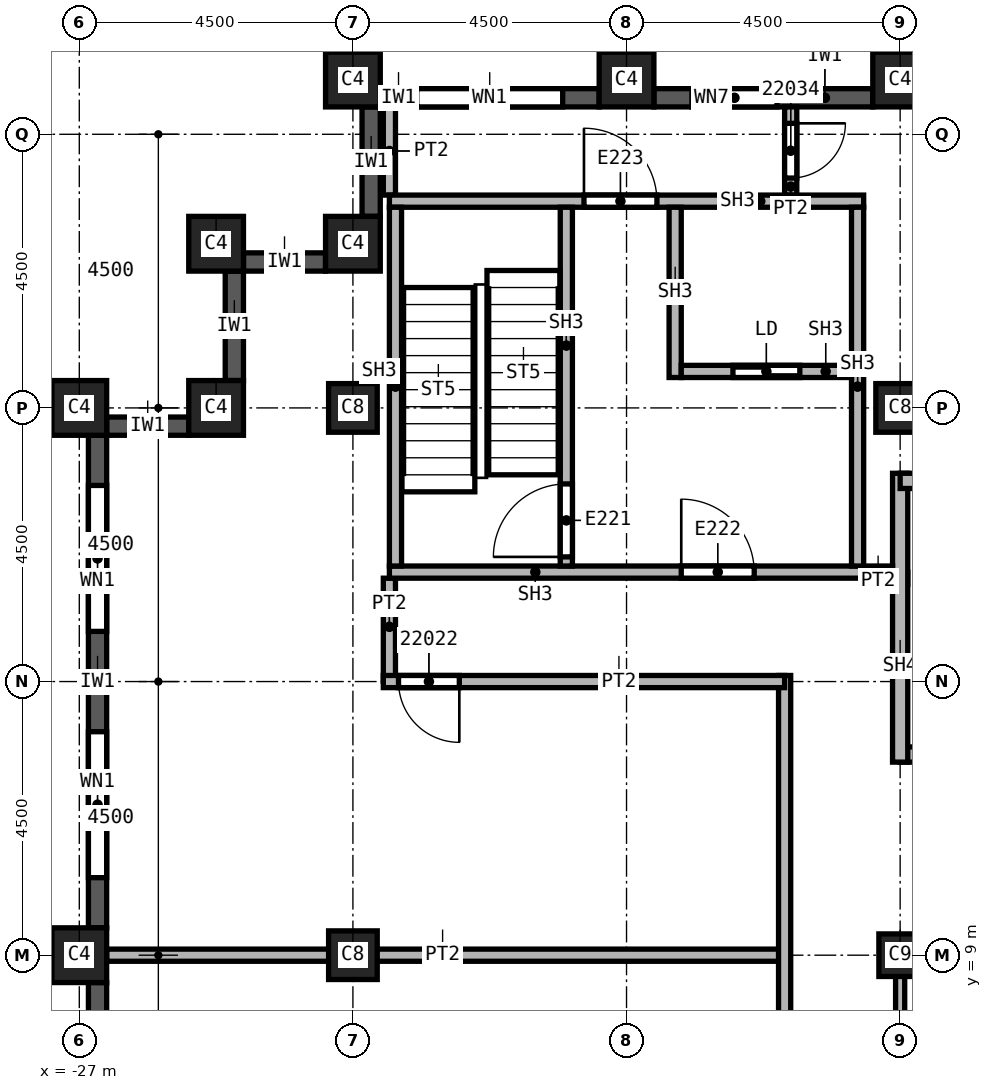
"""IFC4 building model, lengths in metres.
Left out: names, types, materials, properties, quantities, classifications, styles, units other than length and angle.
Written with IfcOpenShell. Run it as: python <this file> out.ifc"""

import sys

from ifc_helpers import new_model, si_unit, direction, frame, frame_2d, origin, origin_2d, place, context, subcontext, project, spatial, rectangle, extrude, element, fill, save


model = new_model("IFC4")
c1 = context("Model", 3, precision=1e-05, world=origin(), true_north=direction((0.0, 1.0)))
c2 = subcontext(c1, "Body", "Model", "MODEL_VIEW")
j1 = project(units=[si_unit("LENGTHUNIT", "METRE"), si_unit("PLANEANGLEUNIT", "RADIAN")], contexts=[c1])
p1 = place(None, origin())
s1 = spatial("IfcSite", under=j1, at=p1, CompositionType="ELEMENT")
p2 = place(p1, origin())
s2 = spatial("IfcBuilding", under=s1, at=p2, CompositionType="ELEMENT")
p3 = place(p2, frame((0.0, 0.0, 316.0)))
s3 = spatial("IfcBuildingStorey", under=s2, at=p3, CompositionType="ELEMENT", Elevation=316.0)
for number, where, z_axis, x_axis in (
    (1, (-13.5, 18.0, 0.0), (0.0, 0.0, 1.0), (1.0, 0.0, 0.0)),
    (2, (-22.5, 9.0, 0.0), (0.0, 0.0, 1.0), (1.0, 0.0, 0.0)),
    (3, (-22.5, 18.0, 0.0), (0.0, 0.0, 1.0), (1.0, 0.0, 0.0)),
):
    element("IfcColumn", number, at=place(p3, frame(where, z_axis=z_axis, x_axis=x_axis)), inside=s3, PredefinedType="COLUMN", context=c2, shape_type="SweptSolid", body=[
        extrude(rectangle(XDim=0.8, YDim=0.8, at=origin_2d()), origin(), (0.0, 0.0, 1.0), 3.59),
    ])
p4 = place(p3, frame((-13.5, 9.0, 0.0), z_axis=(0.0, 0.0, 1.0), x_axis=(1.0, 0.0, 0.0)))
e4 = element("IfcColumn", 4, at=p4, inside=s3, PredefinedType="COLUMN", context=c2, shape_type="SweptSolid", body=[
    extrude(rectangle(XDim=0.7, YDim=0.7, at=origin_2d()), origin(), (0.0, 0.0, 1.0), 3.59),
])
for number, where, z_axis, x_axis in (
    (5, (-13.5, 23.4, 0.0), (0.0, 0.0, 1.0), (1.0, 0.0, 0.0)),
    (6, (-18.0, 23.4, 0.0), (0.0, 0.0, 1.0), (1.0, 0.0, 0.0)),
    (7, (-22.5, 23.4, 0.0), (0.0, 0.0, 1.0), (1.0, 0.0, 0.0)),
    (8, (-27.0, 9.0, 0.0), (0.0, 0.0, 1.0), (0.0, 1.0, 0.0)),
    (9, (-27.0, 18.0, 0.0), (0.0, 0.0, 1.0), (0.0, 1.0, 0.0)),
    (10, (-22.5, 20.7, 0.0), (0.0, 0.0, 1.0), (1.0, 0.0, 0.0)),
    (11, (-24.75, 20.7, 0.0), (0.0, 0.0, 1.0), (1.0, 0.0, 0.0)),
    (12, (-24.75, 18.0, 0.0), (0.0, 0.0, 1.0), (1.0, 0.0, 0.0)),
):
    element("IfcColumn", number, at=place(p3, frame(where, z_axis=z_axis, x_axis=x_axis)), inside=s3, PredefinedType="COLUMN", context=c2, shape_type="SweptSolid", body=[
        extrude(rectangle(XDim=0.9, YDim=0.9, at=origin_2d()), origin(), (0.0, 0.0, 1.0), 3.59),
    ])
p5 = place(p3, frame((-24.45, 20.25, 0.0), z_axis=(0.0, 0.0, 1.0), x_axis=(0.0, -1.0, 0.0)))
e13 = element("IfcWall", 13, at=p5, inside=s3, PredefinedType="SOLIDWALL", context=c2, shape_type="SweptSolid", body=[
    extrude(rectangle(XDim=1.8, YDim=0.3, at=frame_2d((0.9, 0.0))), origin(), (0.0, 0.0, 1.0), 2.99),
])
p6 = place(p3, frame((-25.2, 17.7, 0.0), z_axis=(0.0, 0.0, 1.0), x_axis=(-1.0, 0.0, 0.0)))
e14 = element("IfcWall", 14, at=p6, inside=s3, PredefinedType="SOLIDWALL", context=c2, shape_type="SweptSolid", body=[
    extrude(rectangle(XDim=1.35, YDim=0.3, at=frame_2d((0.675, 0.0))), origin(), (0.0, 0.0, 1.0), 2.99),
])
p7 = place(p3, frame((-26.7, 17.55, 0.0), z_axis=(0.0, 0.0, 1.0), x_axis=(0.0, -1.0, 0.0)))
e15 = element("IfcWall", 15, at=p7, inside=s3, PredefinedType="SOLIDWALL", context=c2, shape_type="SweptSolid", body=[
    extrude(rectangle(XDim=8.1, YDim=0.3, at=frame_2d((4.05, 0.0))), origin(), (0.0, 0.0, 1.0), 2.99),
])
p8 = place(p7, frame((0.825, 0.0, 0.8)))
e16 = element("IfcOpeningElement", 16, at=p8, cuts=e15, PredefinedType="OPENING", context=c2, shape_type="SweptSolid", body=[
    extrude(rectangle(XDim=2.4, YDim=1.95, at=frame_2d((1.2, 0.975))), frame((0.0, 0.15, 0.0), z_axis=(0.0, -1.0, 0.0), x_axis=(1.0, 0.0, 0.0)), (0.0, 0.0, 1.0), 0.3),
])
p9 = place(p7, frame((4.875, 0.0, 0.8)))
e17 = element("IfcOpeningElement", 17, at=p9, cuts=e15, PredefinedType="OPENING", context=c2, shape_type="SweptSolid", body=[
    extrude(rectangle(XDim=2.4, YDim=1.95, at=frame_2d((1.2, 0.975))), frame((0.0, 0.15, 0.0), z_axis=(0.0, -1.0, 0.0), x_axis=(1.0, 0.0, 0.0)), (0.0, 0.0, 1.0), 0.3),
])
p10 = place(p3, frame((-26.7, 8.55, 0.0), z_axis=(0.0, 0.0, 1.0), x_axis=(0.0, -1.0, 0.0)))
e18 = element("IfcWall", 18, at=p10, inside=s3, PredefinedType="SOLIDWALL", context=c2, shape_type="SweptSolid", body=[
    extrude(rectangle(XDim=8.1, YDim=0.3, at=frame_2d((4.05, 0.0))), origin(), (0.0, 0.0, 1.0), 2.99),
])
p11 = place(p10, frame((0.825, 0.0, 0.8)))
e19 = element("IfcOpeningElement", 19, at=p11, cuts=e18, PredefinedType="OPENING", context=c2, shape_type="SweptSolid", body=[
    extrude(rectangle(XDim=2.4, YDim=1.95, at=frame_2d((1.2, 0.975))), frame((0.0, 0.15, 0.0), z_axis=(0.0, -1.0, 0.0), x_axis=(1.0, 0.0, 0.0)), (0.0, 0.0, 1.0), 0.3),
])
p12 = place(p10, frame((4.875, 0.0, 0.8)))
e20 = element("IfcOpeningElement", 20, at=p12, cuts=e18, PredefinedType="OPENING", context=c2, shape_type="SweptSolid", body=[
    extrude(rectangle(XDim=2.4, YDim=1.95, at=frame_2d((1.2, 0.975))), frame((0.0, 0.15, 0.0), z_axis=(0.0, -1.0, 0.0), x_axis=(1.0, 0.0, 0.0)), (0.0, 0.0, 1.0), 0.3),
])
p13 = place(p3, frame((-13.95, 23.1, 0.0), z_axis=(0.0, 0.0, 1.0), x_axis=(-1.0, 0.0, 0.0)))
e21 = element("IfcWall", 21, at=p13, inside=s3, PredefinedType="SOLIDWALL", context=c2, shape_type="SweptSolid", body=[
    extrude(rectangle(XDim=3.6, YDim=0.3, at=frame_2d((1.8, 0.0))), origin(), (0.0, 0.0, 1.0), 2.99),
])
p14 = place(p13, frame((1.575, 0.0, 0.8)))
e22 = element("IfcOpeningElement", 22, at=p14, cuts=e21, PredefinedType="OPENING", context=c2, shape_type="SweptSolid", body=[
    extrude(rectangle(XDim=1.4, YDim=1.95, at=frame_2d((0.7, 0.975))), frame((0.0, 0.15, 0.0), z_axis=(0.0, -1.0, 0.0), x_axis=(1.0, 0.0, 0.0)), (0.0, 0.0, 1.0), 0.3),
])
p15 = place(p3, frame((-18.45, 23.1, 0.0), z_axis=(0.0, 0.0, 1.0), x_axis=(-1.0, 0.0, 0.0)))
e23 = element("IfcWall", 23, at=p15, inside=s3, PredefinedType="SOLIDWALL", context=c2, shape_type="SweptSolid", body=[
    extrude(rectangle(XDim=3.6, YDim=0.3, at=frame_2d((1.8, 0.0))), origin(), (0.0, 0.0, 1.0), 2.99),
])
p16 = place(p15, frame((0.6, 0.0, 0.8)))
e24 = element("IfcOpeningElement", 24, at=p16, cuts=e23, PredefinedType="OPENING", context=c2, shape_type="SweptSolid", body=[
    extrude(rectangle(XDim=2.4, YDim=1.95, at=frame_2d((1.2, 0.975))), frame((0.0, 0.15, 0.0), z_axis=(0.0, -1.0, 0.0), x_axis=(1.0, 0.0, 0.0)), (0.0, 0.0, 1.0), 0.3),
])
p17 = place(p3, frame((-22.2, 22.95, 0.0), z_axis=(0.0, 0.0, 1.0), x_axis=(0.0, -1.0, 0.0)))
e25 = element("IfcWall", 25, at=p17, inside=s3, PredefinedType="SOLIDWALL", context=c2, shape_type="SweptSolid", body=[
    extrude(rectangle(XDim=1.8, YDim=0.3, at=frame_2d((0.9, 0.0))), origin(), (0.0, 0.0, 1.0), 2.99),
])
p18 = place(p3, frame((-22.95, 20.4, 0.0), z_axis=(0.0, 0.0, 1.0), x_axis=(-1.0, 0.0, 0.0)))
e26 = element("IfcWall", 26, at=p18, inside=s3, PredefinedType="SOLIDWALL", context=c2, shape_type="SweptSolid", body=[
    extrude(rectangle(XDim=1.35, YDim=0.3, at=frame_2d((0.675, 0.0))), origin(), (0.0, 0.0, 1.0), 2.99),
])
p19 = place(p3, frame((-26.55, 9.0, 0.0), z_axis=(0.0, 0.0, 1.0), x_axis=(1.0, 0.0, 0.0)))
e27 = element("IfcWall", 27, at=p19, inside=s3, PredefinedType="PARTITIONING", context=c2, shape_type="SweptSolid", body=[
    extrude(rectangle(XDim=11.15, YDim=0.2, at=frame_2d((5.575, 0.0))), origin(), (0.0, 0.0, 1.0), 3.59),
])
p20 = place(p3, frame((-21.9, 13.5, 0.0), z_axis=(0.0, 0.0, 1.0), x_axis=(0.0, 1.0, 0.0)))
e28 = element("IfcWall", 28, at=p20, inside=s3, PredefinedType="PARTITIONING", context=c2, shape_type="SweptSolid", body=[
    extrude(rectangle(XDim=1.7, YDim=0.2, at=frame_2d((0.85, 0.0))), origin(), (0.0, 0.0, 1.0), 3.59),
])
p21 = place(p3, frame((-21.9, 21.5, 0.0), z_axis=(0.0, 0.0, 1.0), x_axis=(0.0, 1.0, 0.0)))
e29 = element("IfcWall", 29, at=p21, inside=s3, PredefinedType="PARTITIONING", context=c2, shape_type="SweptSolid", body=[
    extrude(rectangle(XDim=1.45, YDim=0.2, at=frame_2d((0.725, 0.0))), origin(), (0.0, 0.0, 1.0), 3.59),
])
p22 = place(p3, frame((-15.4, -22.95, 0.0), z_axis=(0.0, 0.0, 1.0), x_axis=(0.0, 1.0, 0.0)))
e30 = element("IfcWall", 30, at=p22, inside=s3, PredefinedType="PARTITIONING", context=c2, shape_type="SweptSolid", body=[
    extrude(rectangle(XDim=36.55, YDim=0.2, at=frame_2d((18.275, 0.0))), origin(), (0.0, 0.0, 1.0), 3.59),
])
p23 = place(p22, frame((24.3, 0.0, 0.0)))
e31 = element("IfcOpeningElement", 31, at=p23, cuts=e30, PredefinedType="OPENING", context=c2, shape_type="SweptSolid", body=[
    extrude(rectangle(XDim=1.0, YDim=2.1, at=frame_2d((0.5, 1.05))), frame((0.0, 0.1, 0.0), z_axis=(0.0, -1.0, 0.0), x_axis=(1.0, 0.0, 0.0)), (0.0, 0.0, 1.0), 0.2),
])
p24 = place(p22, frame((9.4, 0.0, 0.0)))
e32 = element("IfcOpeningElement", 32, at=p24, cuts=e30, PredefinedType="OPENING", context=c2, shape_type="SweptSolid", body=[
    extrude(rectangle(XDim=1.0, YDim=2.1, at=frame_2d((0.5, 1.05))), frame((0.0, 0.1, 0.0), z_axis=(0.0, -1.0, 0.0), x_axis=(1.0, 0.0, 0.0)), (0.0, 0.0, 1.0), 0.2),
])
p25 = place(p22, frame((19.05, 0.0, 0.0)))
e33 = element("IfcOpeningElement", 33, at=p25, cuts=e30, PredefinedType="OPENING", context=c2, shape_type="SweptSolid", body=[
    extrude(rectangle(XDim=1.0, YDim=2.1, at=frame_2d((0.5, 1.05))), frame((0.0, 0.1, 0.0), z_axis=(0.0, -1.0, 0.0), x_axis=(1.0, 0.0, 0.0)), (0.0, 0.0, 1.0), 0.2),
])
p26 = place(p3, frame((-15.4, 13.5, 0.0), z_axis=(0.0, 0.0, 1.0), x_axis=(-1.0, 0.0, 0.0)))
e34 = element("IfcWall", 34, at=p26, inside=s3, PredefinedType="PARTITIONING", context=c2, shape_type="SweptSolid", body=[
    extrude(rectangle(XDim=6.6, YDim=0.2, at=frame_2d((3.3, 0.0))), origin(), (0.0, 0.0, 1.0), 3.59),
])
p27 = place(p26, frame((5.35, 0.0, 0.0)))
e35 = element("IfcOpeningElement", 35, at=p27, cuts=e34, PredefinedType="OPENING", context=c2, shape_type="SweptSolid", body=[
    extrude(rectangle(XDim=1.0, YDim=2.1, at=frame_2d((0.5, 1.05))), frame((0.0, 0.1, 0.0), z_axis=(0.0, -1.0, 0.0), x_axis=(1.0, 0.0, 0.0)), (0.0, 0.0, 1.0), 0.2),
])
p28 = place(p3, frame((-15.3, 22.95, 0.0), z_axis=(0.0, 0.0, 1.0), x_axis=(0.0, -1.0, 0.0)))
e36 = element("IfcWall", 36, at=p28, inside=s3, PredefinedType="PARTITIONING", context=c2, shape_type="SweptSolid", body=[
    extrude(rectangle(XDim=1.45, YDim=0.2, at=frame_2d((0.725, 0.0))), origin(), (0.0, 0.0, 1.0), 3.59),
])
p29 = place(p28, frame((0.27, 0.0, 0.0)))
e37 = element("IfcOpeningElement", 37, at=p29, cuts=e36, PredefinedType="OPENING", context=c2, shape_type="SweptSolid", body=[
    extrude(rectangle(XDim=0.9, YDim=2.1, at=frame_2d((0.45, 1.05))), frame((0.0, 0.1, 0.0), z_axis=(0.0, -1.0, 0.0), x_axis=(1.0, 0.0, 0.0)), (0.0, 0.0, 1.0), 0.2),
])
p30 = place(p3, frame((-14.1, 15.2, 0.0), z_axis=(0.0, 0.0, 1.0), x_axis=(1.0, 0.0, 0.0)))
e38 = element("IfcWall", 38, at=p30, inside=s3, PredefinedType="PARTITIONING", context=c2, shape_type="SweptSolid", body=[
    extrude(rectangle(XDim=0.725, YDim=0.2, at=frame_2d((0.363, 0.0))), origin(), (0.0, 0.0, 1.0), 3.59),
])
p31 = place(p3, frame((-13.5, 12.3, 0.0), z_axis=(0.0, 0.0, 1.0), x_axis=(1.0, 0.0, 0.0)))
e39 = element("IfcWall", 39, at=p31, inside=s3, PredefinedType="SOLIDWALL", context=c2, shape_type="SweptSolid", body=[
    extrude(rectangle(XDim=9.125, YDim=0.25, at=frame_2d((4.562, 0.0))), origin(), (0.0, 0.0, 1.0), 3.59),
])
p32 = place(p31, frame((0.6, 0.0, 0.0)))
e40 = element("IfcOpeningElement", 40, at=p32, cuts=e39, PredefinedType="OPENING", context=c2, shape_type="SweptSolid", body=[
    extrude(rectangle(XDim=1.2, YDim=2.1, at=frame_2d((0.6, 1.05))), frame((0.0, 0.125, 0.0), z_axis=(0.0, -1.0, 0.0), x_axis=(1.0, 0.0, 0.0)), (0.0, 0.0, 1.0), 0.25),
])
p33 = place(p3, frame((-13.5, 12.175, 0.0), z_axis=(0.0, 0.0, 1.0), x_axis=(0.0, 1.0, 0.0)))
e41 = element("IfcWall", 41, at=p33, inside=s3, PredefinedType="SOLIDWALL", context=c2, shape_type="SweptSolid", body=[
    extrude(rectangle(XDim=4.75, YDim=0.25, at=frame_2d((2.375, 0.0))), origin(), (0.0, 0.0, 1.0), 3.59),
])
p34 = place(p3, frame((-13.5, 16.8, 0.0), z_axis=(0.0, 0.0, 1.0), x_axis=(1.0, 0.0, 0.0)))
e42 = element("IfcWall", 42, at=p34, inside=s3, PredefinedType="SOLIDWALL", context=c2, shape_type="SweptSolid", body=[
    extrude(rectangle(XDim=9.125, YDim=0.25, at=frame_2d((4.562, 0.0))), origin(), (0.0, 0.0, 1.0), 3.59),
])
p35 = place(p3, frame((-13.5, 3.0, 0.0), z_axis=(0.0, 0.0, 1.0), x_axis=(0.0, 1.0, 0.0)))
e43 = element("IfcWall", 43, at=p35, inside=s3, PredefinedType="PARTITIONING", context=c2, shape_type="SweptSolid", body=[
    extrude(rectangle(XDim=6.075, YDim=0.15, at=frame_2d((3.038, 0.0))), origin(), (0.0, 0.0, 1.0), 2.828),
])
p36 = place(p3, frame((-13.5, 9.0, 0.0), z_axis=(0.0, 0.0, 1.0), x_axis=(1.0, 0.0, 0.0)))
e44 = element("IfcWall", 44, at=p36, inside=s3, PredefinedType="PARTITIONING", context=c2, shape_type="SweptSolid", body=[
    extrude(rectangle(XDim=3.0, YDim=0.15, at=frame_2d((1.5, 0.0))), origin(), (0.0, 0.0, 1.0), 2.828),
])
p37 = place(p3, frame((-21.9, 15.3, 0.0), z_axis=(0.0, 0.0, 1.0), x_axis=(1.0, 0.0, 0.0)))
e45 = element("IfcWall", 45, at=p37, inside=s3, PredefinedType="SOLIDWALL", context=c2, shape_type="SweptSolid", body=[
    extrude(rectangle(XDim=8.275, YDim=0.2, at=frame_2d((4.137, 0.0))), origin(), (0.0, 0.0, 1.0), 3.59),
])
p38 = place(p37, frame((4.8, 0.0, 0.0)))
e46 = element("IfcOpeningElement", 46, at=p38, cuts=e45, PredefinedType="OPENING", context=c2, shape_type="SweptSolid", body=[
    extrude(rectangle(XDim=1.2, YDim=2.1, at=frame_2d((0.6, 1.05))), frame((0.0, 0.1, 0.0), z_axis=(0.0, -1.0, 0.0), x_axis=(1.0, 0.0, 0.0)), (0.0, 0.0, 1.0), 0.2),
])
p39 = place(p3, frame((-21.9, 21.4, 0.0), z_axis=(0.0, 0.0, 1.0), x_axis=(1.0, 0.0, 0.0)))
e47 = element("IfcWall", 47, at=p39, inside=s3, PredefinedType="SOLIDWALL", context=c2, shape_type="SweptSolid", body=[
    extrude(rectangle(XDim=7.8, YDim=0.2, at=frame_2d((3.9, 0.0))), origin(), (0.0, 0.0, 1.0), 3.59),
])
p40 = place(p39, frame((3.2, 0.0, 0.0)))
e48 = element("IfcOpeningElement", 48, at=p40, cuts=e47, PredefinedType="OPENING", context=c2, shape_type="SweptSolid", body=[
    extrude(rectangle(XDim=1.2, YDim=2.1, at=frame_2d((0.6, 1.05))), frame((0.0, 0.1, 0.0), z_axis=(0.0, -1.0, 0.0), x_axis=(1.0, 0.0, 0.0)), (0.0, 0.0, 1.0), 0.2),
])
for number, where, z_axis, x_axis in (
    (49, (-21.8, 15.4, 0.0), (0.0, 0.0, 1.0), (0.0, 1.0, 0.0)),
    (50, (-14.2, 15.4, 0.0), (0.0, 0.0, 1.0), (0.0, 1.0, 0.0)),
):
    element("IfcWall", number, at=place(p3, frame(where, z_axis=z_axis, x_axis=x_axis)), inside=s3, PredefinedType="SOLIDWALL", context=c2, shape_type="SweptSolid", body=[
        extrude(rectangle(XDim=5.9, YDim=0.2, at=frame_2d((2.95, 0.0))), origin(), (0.0, 0.0, 1.0), 3.59),
    ])
p41 = place(p3, frame((-18.99, 15.4, 0.0), z_axis=(0.0, 0.0, 1.0), x_axis=(0.0, 1.0, 0.0)))
e51 = element("IfcWall", 51, at=p41, inside=s3, PredefinedType="SOLIDWALL", context=c2, shape_type="SweptSolid", body=[
    extrude(rectangle(XDim=5.9, YDim=0.2, at=frame_2d((2.95, 0.0))), origin(), (0.0, 0.0, 1.0), 3.59),
])
p42 = place(p41, frame((0.15, 0.0, 0.0)))
e52 = element("IfcOpeningElement", 52, at=p42, cuts=e51, PredefinedType="OPENING", context=c2, shape_type="SweptSolid", body=[
    extrude(rectangle(XDim=1.2, YDim=2.1, at=frame_2d((0.6, 1.05))), frame((0.0, 0.1, 0.0), z_axis=(0.0, -1.0, 0.0), x_axis=(1.0, 0.0, 0.0)), (0.0, 0.0, 1.0), 0.2),
])
p43 = place(p3, frame((-17.2, 18.5, 0.0), z_axis=(0.0, 0.0, 1.0), x_axis=(0.0, 1.0, 0.0)))
e53 = element("IfcWall", 53, at=p43, inside=s3, PredefinedType="SOLIDWALL", context=c2, shape_type="SweptSolid", body=[
    extrude(rectangle(XDim=2.8, YDim=0.2, at=frame_2d((1.4, 0.0))), origin(), (0.0, 0.0, 1.0), 3.59),
])
p44 = place(p3, frame((-17.1, 18.6, 0.0), z_axis=(0.0, 0.0, 1.0), x_axis=(1.0, 0.0, 0.0)))
e54 = element("IfcWall", 54, at=p44, inside=s3, PredefinedType="SOLIDWALL", context=c2, shape_type="SweptSolid", body=[
    extrude(rectangle(XDim=2.8, YDim=0.2, at=frame_2d((1.4, 0.0))), origin(), (0.0, 0.0, 1.0), 3.59),
])
p45 = place(p44, frame((0.85, 0.0, 0.0)))
e55 = element("IfcOpeningElement", 55, at=p45, cuts=e54, PredefinedType="OPENING", context=c2, shape_type="SweptSolid", body=[
    extrude(rectangle(XDim=1.1, YDim=2.1, at=frame_2d((0.55, 1.05))), frame((0.0, 0.1, 0.0), z_axis=(0.0, -1.0, 0.0), x_axis=(1.0, 0.0, 0.0)), (0.0, 0.0, 1.0), 0.2),
])
p46 = place(p8, origin())
e56 = element("IfcWindow", 56, at=p46, inside=s3, PartitioningType="SINGLE_PANEL", PredefinedType="WINDOW", context=c2, shape_type="SweptSolid", body=[
    extrude(rectangle(XDim=2.4, YDim=1.95, at=frame_2d((1.2, 0.975))), frame((0.0, 0.03, 0.0), z_axis=(0.0, -1.0, 0.0), x_axis=(1.0, 0.0, 0.0)), (0.0, 0.0, 1.0), 0.06),
])
fill(e16, e56)
p47 = place(p9, origin())
e57 = element("IfcWindow", 57, at=p47, inside=s3, PartitioningType="SINGLE_PANEL", PredefinedType="WINDOW", context=c2, shape_type="SweptSolid", body=[
    extrude(rectangle(XDim=2.4, YDim=1.95, at=frame_2d((1.2, 0.975))), frame((0.0, 0.03, 0.0), z_axis=(0.0, -1.0, 0.0), x_axis=(1.0, 0.0, 0.0)), (0.0, 0.0, 1.0), 0.06),
])
fill(e17, e57)
p48 = place(p16, origin())
e58 = element("IfcWindow", 58, at=p48, inside=s3, PartitioningType="SINGLE_PANEL", PredefinedType="WINDOW", context=c2, shape_type="SweptSolid", body=[
    extrude(rectangle(XDim=2.4, YDim=1.95, at=frame_2d((1.2, 0.975))), frame((0.0, 0.03, 0.0), z_axis=(0.0, -1.0, 0.0), x_axis=(1.0, 0.0, 0.0)), (0.0, 0.0, 1.0), 0.06),
])
fill(e24, e58)
p49 = place(p27, origin())
e59 = element("IfcDoor", 59, at=p49, inside=s3, OperationType="SINGLE_SWING_LEFT", PredefinedType="DOOR", context=c2, shape_type="SweptSolid", body=[
    extrude(rectangle(XDim=1.0, YDim=2.1, at=frame_2d((0.5, 1.05))), frame((0.0, 0.025, 0.0), z_axis=(0.0, -1.0, 0.0), x_axis=(1.0, 0.0, 0.0)), (0.0, 0.0, 1.0), 0.05),
])
fill(e35, e59)
p50 = place(p29, origin())
e60 = element("IfcDoor", 60, at=p50, inside=s3, OperationType="SINGLE_SWING_LEFT", PredefinedType="DOOR", context=c2, shape_type="SweptSolid", body=[
    extrude(rectangle(XDim=0.9, YDim=2.1, at=frame_2d((0.45, 1.05))), frame((0.0, 0.025, 0.0), z_axis=(0.0, -1.0, 0.0), x_axis=(1.0, 0.0, 0.0)), (0.0, 0.0, 1.0), 0.05),
])
fill(e37, e60)
p51 = place(p42, origin())
e61 = element("IfcDoor", 61, at=p51, inside=s3, OperationType="SINGLE_SWING_LEFT", PredefinedType="DOOR", context=c2, shape_type="SweptSolid", body=[
    extrude(rectangle(XDim=1.2, YDim=2.1, at=frame_2d((0.6, 1.05))), frame((0.0, 0.025, 0.0), z_axis=(0.0, -1.0, 0.0), x_axis=(1.0, 0.0, 0.0)), (0.0, 0.0, 1.0), 0.05),
])
fill(e52, e61)
p52 = place(p45, origin())
e62 = element("IfcDoor", 62, at=p52, inside=s3, OperationType="SLIDING_TO_LEFT", PredefinedType="DOOR", context=c2, shape_type="SweptSolid", body=[
    extrude(rectangle(XDim=1.1, YDim=2.1, at=frame_2d((0.55, 1.05))), frame((0.0, 0.025, 0.0), z_axis=(0.0, -1.0, 0.0), x_axis=(1.0, 0.0, 0.0)), (0.0, 0.0, 1.0), 0.05),
])
fill(e55, e62)
p53 = place(p38, origin())
e63 = element("IfcDoor", 63, at=p53, inside=s3, OperationType="SINGLE_SWING_RIGHT", PredefinedType="DOOR", context=c2, shape_type="SweptSolid", body=[
    extrude(rectangle(XDim=1.2, YDim=2.1, at=frame_2d((0.6, 1.05))), frame((0.0, 0.025, 0.0), z_axis=(0.0, -1.0, 0.0), x_axis=(1.0, 0.0, 0.0)), (0.0, 0.0, 1.0), 0.05),
])
fill(e46, e63)
p54 = place(p40, origin())
e64 = element("IfcDoor", 64, at=p54, inside=s3, OperationType="SINGLE_SWING_LEFT", PredefinedType="DOOR", context=c2, shape_type="SweptSolid", body=[
    extrude(rectangle(XDim=1.2, YDim=2.1, at=frame_2d((0.6, 1.05))), frame((0.0, 0.025, 0.0), z_axis=(0.0, -1.0, 0.0), x_axis=(1.0, 0.0, 0.0)), (0.0, 0.0, 1.0), 0.05),
])
fill(e48, e64)
p55 = place(p14, origin())
e65 = element("IfcWindow", 65, at=p55, inside=s3, PartitioningType="SINGLE_PANEL", PredefinedType="WINDOW", context=c2, shape_type="SweptSolid", body=[
    extrude(rectangle(XDim=1.4, YDim=1.95, at=frame_2d((0.7, 0.975))), frame((0.0, 0.03, 0.0), z_axis=(0.0, -1.0, 0.0), x_axis=(1.0, 0.0, 0.0)), (0.0, 0.0, 1.0), 0.06),
])
fill(e22, e65)
save(model, sys.argv[1])
